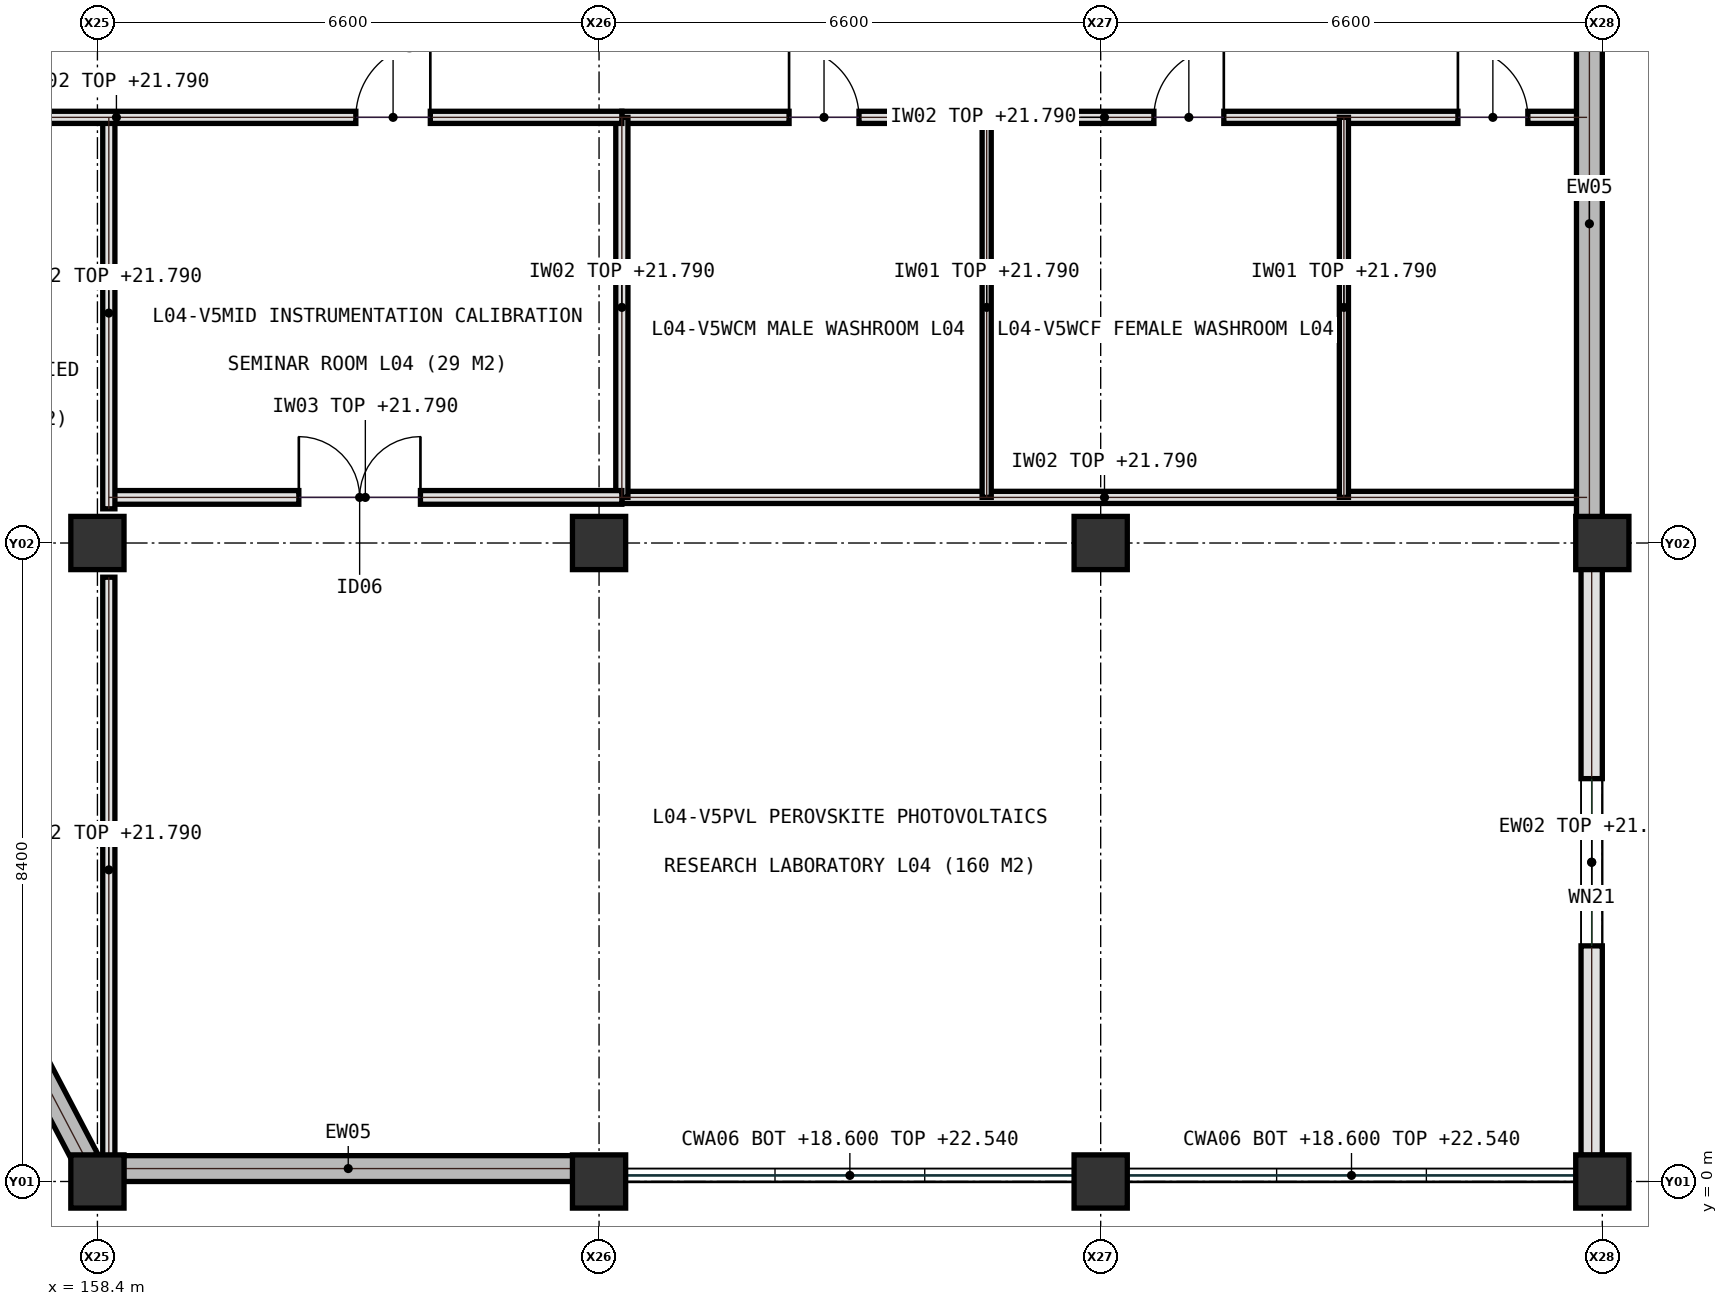
"""IFC4 building model, lengths in metres.
Left out: names, types, materials, properties, quantities, classifications, styles, units other than length and angle.
Written with IfcOpenShell. Run it as: python <this file> out.ifc"""

import sys

from ifc_helpers import new_model, si_unit, direction, frame, frame_2d, origin, origin_2d, place, context, subcontext, project, spatial, rectangle, extrude, element, fill, save


model = new_model("IFC4")
c1 = context("Model", 3, precision=1e-05, world=origin(), true_north=direction((0.0, 1.0)))
c2 = subcontext(c1, "Body", "Model", "MODEL_VIEW")
j1 = project(units=[si_unit("LENGTHUNIT", "METRE"), si_unit("PLANEANGLEUNIT", "RADIAN")], contexts=[c1])
p1 = place(None, origin())
s1 = spatial("IfcSite", under=j1, at=p1, CompositionType="ELEMENT")
p2 = place(p1, origin())
s2 = spatial("IfcBuilding", under=s1, at=p2, CompositionType="ELEMENT")
p3 = place(p2, frame((0.0, 0.0, 18.6)))
s3 = spatial("IfcBuildingStorey", under=s2, at=p3, CompositionType="ELEMENT", Elevation=18.6)
for number, where, z_axis, x_axis in (
    (1, (158.4, 0.0, 0.0), (0.0, 0.0, 1.0), (1.0, 0.0, 0.0)),
    (2, (158.4, 8.4, 0.0), (0.0, 0.0, 1.0), (1.0, 0.0, 0.0)),
    (3, (165.0, 0.0, 0.0), (0.0, 0.0, 1.0), (1.0, 0.0, 0.0)),
    (4, (165.0, 8.4, 0.0), (0.0, 0.0, 1.0), (1.0, 0.0, 0.0)),
    (5, (171.6, 0.0, 0.0), (0.0, 0.0, 1.0), (1.0, 0.0, 0.0)),
    (6, (171.6, 8.4, 0.0), (0.0, 0.0, 1.0), (1.0, 0.0, 0.0)),
    (7, (178.2, 0.0, 0.0), (0.0, 0.0, 1.0), (1.0, 0.0, 0.0)),
    (8, (178.2, 8.4, 0.0), (0.0, 0.0, 1.0), (1.0, 0.0, 0.0)),
):
    element("IfcColumn", number, at=place(p3, frame(where, z_axis=z_axis, x_axis=x_axis)), inside=s3, PredefinedType="COLUMN", context=c2, shape_type="SweptSolid", body=[
        extrude(rectangle(XDim=0.7, YDim=0.7, at=origin_2d()), origin(), (0.0, 0.0, 1.0), 4.2),
    ])
p4 = place(p3, frame((165.3, 14.0, 0.0), z_axis=(0.0, 0.0, 1.0), x_axis=(1.0, 0.0, 0.0)))
e9 = element("IfcWall", 9, at=p4, inside=s3, PredefinedType="PARTITIONING", context=c2, shape_type="SweptSolid", body=[
    extrude(rectangle(XDim=12.7, YDim=0.16, at=frame_2d((6.35, 0.0))), origin(), (0.0, 0.0, 1.0), 3.19),
])
p5 = place(p4, frame((2.2, 0.0, 0.0)))
e10 = element("IfcOpeningElement", 10, at=p5, cuts=e9, PredefinedType="OPENING", context=c2, shape_type="SweptSolid", body=[
    extrude(rectangle(XDim=0.92, YDim=2.08, at=frame_2d((0.46, 1.04))), frame((0.0, 0.09, 0.0), z_axis=(0.0, -1.0, 0.0), x_axis=(1.0, 0.0, 0.0)), (0.0, 0.0, 1.0), 0.18),
])
p6 = place(p4, frame((7.0, 0.0, 0.0)))
e11 = element("IfcOpeningElement", 11, at=p6, cuts=e9, PredefinedType="OPENING", context=c2, shape_type="SweptSolid", body=[
    extrude(rectangle(XDim=0.92, YDim=2.08, at=frame_2d((0.46, 1.04))), frame((0.0, 0.09, 0.0), z_axis=(0.0, -1.0, 0.0), x_axis=(1.0, 0.0, 0.0)), (0.0, 0.0, 1.0), 0.18),
])
p7 = place(p4, frame((11.0, 0.0, 0.0)))
e12 = element("IfcOpeningElement", 12, at=p7, cuts=e9, PredefinedType="OPENING", context=c2, shape_type="SweptSolid", body=[
    extrude(rectangle(XDim=0.92, YDim=2.08, at=frame_2d((0.46, 1.04))), frame((0.0, 0.09, 0.0), z_axis=(0.0, -1.0, 0.0), x_axis=(1.0, 0.0, 0.0)), (0.0, 0.0, 1.0), 0.18),
])
p8 = place(p3, frame((165.3, 9.0, 0.0), z_axis=(0.0, 0.0, 1.0), x_axis=(1.0, 0.0, 0.0)))
e13 = element("IfcWall", 13, at=p8, inside=s3, PredefinedType="PARTITIONING", context=c2, shape_type="SweptSolid", body=[
    extrude(rectangle(XDim=12.7, YDim=0.16, at=frame_2d((6.35, 0.0))), origin(), (0.0, 0.0, 1.0), 3.19),
])
p9 = place(p3, frame((165.3, 9.0, 0.0), z_axis=(0.0, 0.0, 1.0), x_axis=(0.0, 1.0, 0.0)))
e14 = element("IfcWall", 14, at=p9, inside=s3, PredefinedType="PARTITIONING", context=c2, shape_type="SweptSolid", body=[
    extrude(rectangle(XDim=5.0, YDim=0.16, at=frame_2d((2.5, 0.0))), origin(), (0.0, 0.0, 1.0), 3.19),
])
for number, where, z_axis, x_axis in (
    (15, (170.1, 9.0, 0.0), (0.0, 0.0, 1.0), (0.0, 1.0, 0.0)),
    (16, (174.8, 9.0, 0.0), (0.0, 0.0, 1.0), (0.0, 1.0, 0.0)),
):
    element("IfcWall", number, at=place(p3, frame(where, z_axis=z_axis, x_axis=x_axis)), inside=s3, PredefinedType="PARTITIONING", context=c2, shape_type="SweptSolid", body=[
        extrude(rectangle(XDim=5.0, YDim=0.12, at=frame_2d((2.5, 0.0))), origin(), (0.0, 0.0, 1.0), 3.19),
    ])
p10 = place(p3, frame((158.55, 9.0, 0.0), z_axis=(0.0, 0.0, 1.0), x_axis=(1.0, 0.0, 0.0)))
e17 = element("IfcWall", 17, at=p10, inside=s3, PredefinedType="SOLIDWALL", context=c2, shape_type="SweptSolid", body=[
    extrude(rectangle(XDim=6.75, YDim=0.18, at=frame_2d((3.375, 0.0))), origin(), (0.0, 0.0, 1.0), 3.19),
])
p11 = place(p10, frame((2.5, 0.0, 0.0)))
e18 = element("IfcOpeningElement", 18, at=p11, cuts=e17, PredefinedType="OPENING", context=c2, shape_type="SweptSolid", body=[
    extrude(rectangle(XDim=1.6, YDim=2.2, at=frame_2d((0.8, 1.1))), frame((0.0, 0.1, 0.0), z_axis=(0.0, -1.0, 0.0), x_axis=(1.0, 0.0, 0.0)), (0.0, 0.0, 1.0), 0.2),
])
p12 = place(p3, frame((158.55, 0.25, 0.0), z_axis=(0.0, 0.0, 1.0), x_axis=(0.0, 1.0, 0.0)))
e19 = element("IfcWall", 19, at=p12, inside=s3, PredefinedType="PARTITIONING", context=c2, shape_type="SweptSolid", body=[
    extrude(rectangle(XDim=7.7, YDim=0.16, at=frame_2d((3.85, 0.0))), origin(), (0.0, 0.0, 1.0), 3.19),
])
p13 = place(p3, frame((158.55, 8.85, 0.0), z_axis=(0.0, 0.0, 1.0), x_axis=(0.0, 1.0, 0.0)))
e20 = element("IfcWall", 20, at=p13, inside=s3, PredefinedType="PARTITIONING", context=c2, shape_type="SweptSolid", body=[
    extrude(rectangle(XDim=5.15, YDim=0.16, at=frame_2d((2.575, 0.0))), origin(), (0.0, 0.0, 1.0), 3.19),
])
p14 = place(p3, frame((152.0, 14.0, 0.0), z_axis=(0.0, 0.0, 1.0), x_axis=(1.0, 0.0, 0.0)))
e21 = element("IfcWall", 21, at=p14, inside=s3, PredefinedType="PARTITIONING", context=c2, shape_type="SweptSolid", body=[
    extrude(rectangle(XDim=13.3, YDim=0.16, at=frame_2d((6.65, 0.0))), origin(), (0.0, 0.0, 1.0), 3.19),
])
p15 = place(p14, frame((2.6, 0.0, 0.0)))
e22 = element("IfcOpeningElement", 22, at=p15, cuts=e21, PredefinedType="OPENING", context=c2, shape_type="SweptSolid", body=[
    extrude(rectangle(XDim=0.98, YDim=2.12, at=frame_2d((0.49, 1.06))), frame((0.0, 0.09, 0.0), z_axis=(0.0, -1.0, 0.0), x_axis=(1.0, 0.0, 0.0)), (0.0, 0.0, 1.0), 0.18),
])
p16 = place(p14, frame((9.8, 0.0, 0.0)))
e23 = element("IfcOpeningElement", 23, at=p16, cuts=e21, PredefinedType="OPENING", context=c2, shape_type="SweptSolid", body=[
    extrude(rectangle(XDim=0.98, YDim=2.12, at=frame_2d((0.49, 1.06))), frame((0.0, 0.09, 0.0), z_axis=(0.0, -1.0, 0.0), x_axis=(1.0, 0.0, 0.0)), (0.0, 0.0, 1.0), 0.18),
])
p17 = place(p3, frame((158.745, 0.17, 0.0), z_axis=(0.0, 0.0, 1.0), x_axis=(1.0, 0.0, 0.0)))
e24 = element("IfcWall", 24, at=p17, inside=s3, PredefinedType="SHEAR", context=c2, shape_type="SweptSolid", body=[
    extrude(rectangle(XDim=5.91, YDim=0.34, at=frame_2d((2.955, 0.0))), origin(), (0.0, 0.0, 1.0), 3.94),
])
p18 = place(p3, frame((178.06, 0.345, 0.0), z_axis=(0.0, 0.0, 1.0), x_axis=(0.0, 1.0, 0.0)))
e25 = element("IfcWall", 25, at=p18, inside=s3, PredefinedType="SOLIDWALL", context=c2, shape_type="SweptSolid", body=[
    extrude(rectangle(XDim=7.71, YDim=0.28, at=frame_2d((3.855, 0.0))), origin(), (0.0, 0.0, 1.0), 3.325),
])
p19 = place(p18, frame((2.755, 0.0, 0.95)))
e26 = element("IfcOpeningElement", 26, at=p19, cuts=e25, PredefinedType="OPENING", context=c2, shape_type="SweptSolid", body=[
    extrude(rectangle(XDim=2.2, YDim=1.85, at=frame_2d((1.1, 0.925))), frame((0.0, 0.15, 0.0), z_axis=(0.0, -1.0, 0.0), x_axis=(1.0, 0.0, 0.0)), (0.0, 0.0, 1.0), 0.3),
])
p20 = place(p3, frame((178.03, 8.745, 0.0), z_axis=(0.0, 0.0, 1.0), x_axis=(0.0, 1.0, 0.0)))
e27 = element("IfcWall", 27, at=p20, inside=s3, PredefinedType="SHEAR", context=c2, shape_type="SweptSolid", body=[
    extrude(rectangle(XDim=7.71, YDim=0.34, at=frame_2d((3.855, 0.0))), origin(), (0.0, 0.0, 1.0), 3.94),
])
p21 = place(p3, frame((155.25, 6.01, 0.0), z_axis=(0.0, 0.0, 1.0), x_axis=(0.464471613901, -0.885588007981, 0.0)))
e28 = element("IfcWall", 28, at=p21, inside=s3, PredefinedType="SHEAR", context=c2, shape_type="SweptSolid", body=[
    extrude(rectangle(XDim=6.459, YDim=0.34, at=frame_2d((3.229, 0.0))), origin(), (0.0, 0.0, 1.0), 3.94),
])
p22 = place(p5, origin())
e29 = element("IfcDoor", 29, at=p22, inside=s3, OperationType="SINGLE_SWING_LEFT", PredefinedType="DOOR", context=c2, shape_type="SweptSolid", body=[
    extrude(rectangle(XDim=0.92, YDim=2.08, at=frame_2d((0.46, 1.04))), frame((0.0, 0.025, 0.0), z_axis=(0.0, -1.0, 0.0), x_axis=(1.0, 0.0, 0.0)), (0.0, 0.0, 1.0), 0.05),
])
fill(e10, e29)
p23 = place(p6, origin())
e30 = element("IfcDoor", 30, at=p23, inside=s3, OperationType="SINGLE_SWING_RIGHT", PredefinedType="DOOR", context=c2, shape_type="SweptSolid", body=[
    extrude(rectangle(XDim=0.92, YDim=2.08, at=frame_2d((0.46, 1.04))), frame((0.0, 0.025, 0.0), z_axis=(0.0, -1.0, 0.0), x_axis=(1.0, 0.0, 0.0)), (0.0, 0.0, 1.0), 0.05),
])
fill(e11, e30)
p24 = place(p7, origin())
e31 = element("IfcDoor", 31, at=p24, inside=s3, OperationType="SINGLE_SWING_LEFT", PredefinedType="DOOR", context=c2, shape_type="SweptSolid", body=[
    extrude(rectangle(XDim=0.92, YDim=2.08, at=frame_2d((0.46, 1.04))), frame((0.0, 0.025, 0.0), z_axis=(0.0, -1.0, 0.0), x_axis=(1.0, 0.0, 0.0)), (0.0, 0.0, 1.0), 0.05),
])
fill(e12, e31)
p25 = place(p11, origin())
e32 = element("IfcDoor", 32, at=p25, inside=s3, OperationType="DOUBLE_DOOR_SINGLE_SWING", PredefinedType="DOOR", context=c2, shape_type="SweptSolid", body=[
    extrude(rectangle(XDim=1.6, YDim=2.2, at=frame_2d((0.8, 1.1))), frame((0.0, 0.025, 0.0), z_axis=(0.0, -1.0, 0.0), x_axis=(1.0, 0.0, 0.0)), (0.0, 0.0, 1.0), 0.05),
])
fill(e18, e32)
p26 = place(p16, origin())
e33 = element("IfcDoor", 33, at=p26, inside=s3, OperationType="SINGLE_SWING_RIGHT", PredefinedType="DOOR", context=c2, shape_type="SweptSolid", body=[
    extrude(rectangle(XDim=0.98, YDim=2.12, at=frame_2d((0.49, 1.06))), frame((0.0, 0.025, 0.0), z_axis=(0.0, -1.0, 0.0), x_axis=(1.0, 0.0, 0.0)), (0.0, 0.0, 1.0), 0.05),
])
fill(e23, e33)
p27 = place(p19, origin())
e34 = element("IfcWindow", 34, at=p27, inside=s3, PartitioningType="SINGLE_PANEL", PredefinedType="WINDOW", context=c2, shape_type="SweptSolid", body=[
    extrude(rectangle(XDim=2.2, YDim=1.85, at=frame_2d((1.1, 0.925))), frame((0.0, 0.03, 0.0), z_axis=(0.0, -1.0, 0.0), x_axis=(1.0, 0.0, 0.0)), (0.0, 0.0, 1.0), 0.06),
])
fill(e26, e34)
save(model, sys.argv[1])
